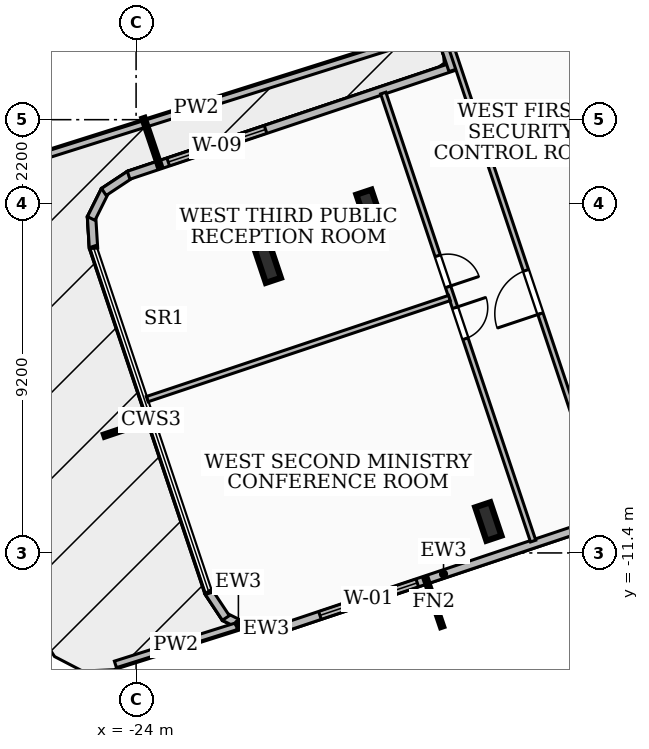
"""IFC4 building model, lengths in metres.
Left out: names, types, materials, properties, quantities, classifications, styles, units other than length and angle.
Written with IfcOpenShell. Run it as: python <this file> out.ifc"""

import sys

from ifc_helpers import new_model, si_unit, direction, frame, frame_2d, origin, origin_2d, place, context, subcontext, project, spatial, rectangle, i_section, extrude, element, fill, save


model = new_model("IFC4")
c1 = context("Model", 3, precision=1e-05, world=origin(), true_north=direction((0.0, 1.0)))
c2 = subcontext(c1, "Body", "Model", "MODEL_VIEW")
j1 = project(units=[si_unit("LENGTHUNIT", "METRE"), si_unit("PLANEANGLEUNIT", "RADIAN")], contexts=[c1])
p1 = place(None, origin())
s1 = spatial("IfcSite", under=j1, at=p1, CompositionType="ELEMENT")
p2 = place(p1, origin())
s2 = spatial("IfcBuilding", under=s1, at=p2, CompositionType="ELEMENT")
p3 = place(p2, frame((0.0, 0.0, 155.88)))
s3 = spatial("IfcBuildingStorey", under=s2, at=p3, CompositionType="ELEMENT", Elevation=155.88)
for number, where, z_axis, x_axis in (
    (1, (-17.858, -2.346, 0.0), (0.0, 0.0, 1.0), (0.948, 0.317, 0.0)),
    (2, (-20.535, -3.788, 0.0), (0.0, 0.0, 1.0), (0.948, 0.317, 0.0)),
    (3, (-14.731, -10.573, 0.0), (0.0, 0.0, 1.0), (0.948, 0.317, 0.0)),
):
    element("IfcColumn", number, at=place(p3, frame(where, z_axis=z_axis, x_axis=x_axis)), inside=s3, PredefinedType="COLUMN", context=c2, shape_type="SweptSolid", body=[
        extrude(i_section(OverallWidth=0.418, OverallDepth=0.927, WebThickness=0.019, FlangeThickness=0.032, at=origin_2d()), origin(), (0.0, 0.0, 1.0), 3.6),
    ])
p4 = place(p3, frame((-11.615, -10.519, 0.0), z_axis=(0.0, 0.0, 1.0), x_axis=(-0.948329626758, -0.317286808759, 0.0)))
e4 = element("IfcWall", 4, at=p4, inside=s3, PredefinedType="SOLIDWALL", context=c2, shape_type="SweptSolid", body=[
    extrude(rectangle(XDim=9.058, YDim=0.22, at=frame_2d((4.529, 0.0))), origin(), (0.0, 0.0, 1.0), 3.34),
])
p5 = place(p4, frame((5.258, 0.0, 0.85)))
e5 = element("IfcOpeningElement", 5, at=p5, cuts=e4, PredefinedType="OPENING", context=c2, shape_type="SweptSolid", body=[
    extrude(rectangle(XDim=2.7, YDim=2.1, at=frame_2d((1.35, 1.05))), frame((0.0, 0.12, 0.0), z_axis=(0.0, -1.0, 0.0), x_axis=(1.0, 0.0, 0.0)), (0.0, 0.0, 1.0), 0.24),
])
p6 = place(p3, frame((-20.156, -13.383, 0.0), z_axis=(0.0, 0.0, 1.0), x_axis=(-0.998057128569, -0.062305442082, 0.0)))
e6 = element("IfcWall", 6, at=p6, inside=s3, PredefinedType="SOLIDWALL", context=c2, shape_type="SweptSolid", body=[
    extrude(rectangle(XDim=0.835, YDim=0.22, at=frame_2d((0.417, 0.0))), origin(), (0.0, 0.0, 1.0), 3.34),
])
p7 = place(p3, frame((-20.942, -13.444, 0.0), z_axis=(0.0, 0.0, 1.0), x_axis=(-0.894963703084, 0.446138958356, 0.0)))
e7 = element("IfcWall", 7, at=p7, inside=s3, PredefinedType="SOLIDWALL", context=c2, shape_type="SweptSolid", body=[
    extrude(rectangle(XDim=0.818, YDim=0.22, at=frame_2d((0.409, 0.0))), origin(), (0.0, 0.0, 1.0), 3.34),
])
p8 = place(p3, frame((-21.638, -13.111, 0.0), z_axis=(0.0, 0.0, 1.0), x_axis=(-0.552336300706, 0.833621383437, 0.0)))
e8 = element("IfcWall", 8, at=p8, inside=s3, PredefinedType="SOLIDWALL", context=c2, shape_type="SweptSolid", body=[
    extrude(rectangle(XDim=0.835, YDim=0.22, at=frame_2d((0.417, 0.0))), origin(), (0.0, 0.0, 1.0), 3.34),
])
p9 = place(p3, frame((-25.12, -3.384, 0.0), z_axis=(0.0, 0.0, 1.0), x_axis=(-0.062378286155, 0.998052578483, 0.0)))
e9 = element("IfcWall", 9, at=p9, inside=s3, PredefinedType="SOLIDWALL", context=c2, shape_type="SweptSolid", body=[
    extrude(rectangle(XDim=0.834, YDim=0.22, at=frame_2d((0.417, 0.0))), origin(), (0.0, 0.0, 1.0), 3.34),
])
p10 = place(p3, frame((-25.181, -2.599, 0.0), z_axis=(0.0, 0.0, 1.0), x_axis=(0.445662792415, 0.895200913459, 0.0)))
e10 = element("IfcWall", 10, at=p10, inside=s3, PredefinedType="SOLIDWALL", context=c2, shape_type="SweptSolid", body=[
    extrude(rectangle(XDim=0.819, YDim=0.22, at=frame_2d((0.41, 0.0))), origin(), (0.0, 0.0, 1.0), 3.34),
])
p11 = place(p3, frame((-24.848, -1.902, 0.0), z_axis=(0.0, 0.0, 1.0), x_axis=(0.833532147948, 0.552470957008, 0.0)))
e11 = element("IfcWall", 11, at=p11, inside=s3, PredefinedType="SOLIDWALL", context=c2, shape_type="SweptSolid", body=[
    extrude(rectangle(XDim=0.835, YDim=0.22, at=frame_2d((0.417, 0.0))), origin(), (0.0, 0.0, 1.0), 3.34),
])
p12 = place(p3, frame((-24.197, -1.463, 0.0), z_axis=(0.0, 0.0, 1.0), x_axis=(0.948337736373, 0.31726256913, 0.0)))
e12 = element("IfcWall", 12, at=p12, inside=s3, PredefinedType="SOLIDWALL", context=c2, shape_type="SweptSolid", body=[
    extrude(rectangle(XDim=9.058, YDim=0.22, at=frame_2d((4.529, 0.0))), origin(), (0.0, 0.0, 1.0), 3.34),
])
p13 = place(p12, frame((1.1, 0.0, 0.85)))
e13 = element("IfcOpeningElement", 13, at=p13, cuts=e12, PredefinedType="OPENING", context=c2, shape_type="SweptSolid", body=[
    extrude(rectangle(XDim=2.7, YDim=1.65, at=frame_2d((1.35, 0.825))), frame((0.0, 0.12, 0.0), z_axis=(0.0, -1.0, 0.0), x_axis=(1.0, 0.0, 0.0)), (0.0, 0.0, 1.0), 0.24),
])
p14 = place(p3, frame((-15.662, 1.3, 0.0), z_axis=(0.0, 0.0, 1.0), x_axis=(-0.317224676093, 0.948350412494, 0.0)))
e14 = element("IfcWall", 14, at=p14, inside=s3, PredefinedType="SOLIDWALL", context=c2, shape_type="SweptSolid", body=[
    extrude(rectangle(XDim=6.758, YDim=0.22, at=frame_2d((3.379, 0.0))), origin(), (0.0, 0.0, 1.0), 3.34),
])
p15 = place(p3, frame((-16.274, 2.255, 0.0), z_axis=(0.0, 0.0, 1.0), x_axis=(-0.953646241079, -0.300929970054, 0.0)))
e15 = element("IfcWall", 15, at=p15, inside=s3, PredefinedType="PARAPET", context=c2, shape_type="SweptSolid", body=[
    extrude(rectangle(XDim=12.88, YDim=0.18, at=frame_2d((6.44, 0.0))), origin(), (0.0, 0.0, 1.0), 0.88),
])
p16 = place(p3, frame((-24.544, -14.333, 0.0), z_axis=(0.0, 0.0, 1.0), x_axis=(0.953694118422, 0.300778204807, 0.0)))
e16 = element("IfcWall", 16, at=p16, inside=s3, PredefinedType="PARAPET", context=c2, shape_type="SweptSolid", body=[
    extrude(rectangle(XDim=3.342, YDim=0.18, at=frame_2d((1.671, 0.0))), origin(), (0.0, 0.0, 1.0), 0.88),
])
p17 = place(p3, frame((-10.372, -14.037, 0.0), z_axis=(0.0, 0.0, 1.0), x_axis=(-0.317298382655, 0.94832575435, 0.0)))
e17 = element("IfcWall", 17, at=p17, inside=s3, PredefinedType="PARTITIONING", context=c2, shape_type="SweptSolid", body=[
    extrude(rectangle(XDim=20.041, YDim=0.145, at=frame_2d((10.021, 0.0))), origin(), (0.0, 0.0, 1.0), 2.644),
])
p18 = place(p17, frame((9.42, 0.0, 0.0)))
e18 = element("IfcOpeningElement", 18, at=p18, cuts=e17, PredefinedType="OPENING", context=c2, shape_type="SweptSolid", body=[
    extrude(rectangle(XDim=1.2, YDim=2.1, at=frame_2d((0.6, 1.05))), frame((0.0, 0.083, 0.0), z_axis=(0.0, -1.0, 0.0), x_axis=(1.0, 0.0, 0.0)), (0.0, 0.0, 1.0), 0.165),
])
p19 = place(p3, frame((-15.755, -4.692, 0.0), z_axis=(0.0, 0.0, 1.0), x_axis=(-0.948309976651, -0.31734553437, 0.0)))
e19 = element("IfcWall", 19, at=p19, inside=s3, PredefinedType="PARTITIONING", context=c2, shape_type="SweptSolid", body=[
    extrude(rectangle(XDim=8.385, YDim=0.145, at=frame_2d((4.193, 0.0))), origin(), (0.0, 0.0, 1.0), 2.793),
])
p20 = place(p3, frame((-17.496, 0.7, 0.0), z_axis=(0.0, 0.0, 1.0), x_axis=(0.317299961245, -0.948325226172, 0.0)))
e20 = element("IfcWall", 20, at=p20, inside=s3, PredefinedType="PARTITIONING", context=c2, shape_type="SweptSolid", body=[
    extrude(rectangle(XDim=12.43, YDim=0.145, at=frame_2d((6.215, 0.0))), origin(), (0.0, 0.0, 1.0), 2.644),
])
p21 = place(p20, frame((4.515, 0.0, 0.0)))
e21 = element("IfcOpeningElement", 21, at=p21, cuts=e20, PredefinedType="OPENING", context=c2, shape_type="SweptSolid", body=[
    extrude(rectangle(XDim=0.86, YDim=2.04, at=frame_2d((0.43, 1.02))), frame((0.0, 0.083, 0.0), z_axis=(0.0, -1.0, 0.0), x_axis=(1.0, 0.0, 0.0)), (0.0, 0.0, 1.0), 0.165),
])
p22 = place(p20, frame((5.955, 0.0, 0.0)))
e22 = element("IfcOpeningElement", 22, at=p22, cuts=e20, PredefinedType="OPENING", context=c2, shape_type="SweptSolid", body=[
    extrude(rectangle(XDim=0.86, YDim=2.04, at=frame_2d((0.43, 1.02))), frame((0.0, 0.083, 0.0), z_axis=(0.0, -1.0, 0.0), x_axis=(1.0, 0.0, 0.0)), (0.0, 0.0, 1.0), 0.165),
])
p23 = place(p5, origin())
e23 = element("IfcWindow", 23, at=p23, inside=s3, PartitioningType="SINGLE_PANEL", PredefinedType="WINDOW", context=c2, shape_type="SweptSolid", body=[
    extrude(rectangle(XDim=2.7, YDim=2.1, at=frame_2d((1.35, 1.05))), frame((0.0, 0.03, 0.0), z_axis=(0.0, -1.0, 0.0), x_axis=(1.0, 0.0, 0.0)), (0.0, 0.0, 1.0), 0.06),
])
fill(e5, e23)
p24 = place(p13, origin())
e24 = element("IfcWindow", 24, at=p24, inside=s3, PartitioningType="SINGLE_PANEL", PredefinedType="WINDOW", context=c2, shape_type="SweptSolid", body=[
    extrude(rectangle(XDim=2.7, YDim=1.65, at=frame_2d((1.35, 0.825))), frame((0.0, 0.03, 0.0), z_axis=(0.0, -1.0, 0.0), x_axis=(1.0, 0.0, 0.0)), (0.0, 0.0, 1.0), 0.06),
])
fill(e13, e24)
p25 = place(p3, frame((0.0, 0.0, -0.26)))
p26 = place(p25, frame((-25.905, -8.291, 0.0)))
p27 = place(p26, frame((0.0, 0.0, 0.21)))
e25 = element("IfcWindow", 25, at=p27, inside=s3, PartitioningType="SINGLE_PANEL", PredefinedType="SKYLIGHT", context=c2, shape_type="SweptSolid", body=[
    extrude(rectangle(XDim=1.0, YDim=1.5, at=origin_2d()), origin(), (0.0, 0.0, 1.0), 0.05),
])
p28 = place(p18, origin())
e26 = element("IfcDoor", 26, at=p28, inside=s3, OperationType="SINGLE_SWING_LEFT", PredefinedType="DOOR", context=c2, shape_type="SweptSolid", body=[
    extrude(rectangle(XDim=1.2, YDim=2.1, at=frame_2d((0.6, 1.05))), frame((0.0, 0.025, 0.0), z_axis=(0.0, -1.0, 0.0), x_axis=(1.0, 0.0, 0.0)), (0.0, 0.0, 1.0), 0.05),
])
fill(e18, e26)
p29 = place(p21, origin())
e27 = element("IfcDoor", 27, at=p29, inside=s3, OperationType="SINGLE_SWING_RIGHT", PredefinedType="DOOR", context=c2, shape_type="SweptSolid", body=[
    extrude(rectangle(XDim=0.86, YDim=2.04, at=frame_2d((0.43, 1.02))), frame((0.0, 0.025, 0.0), z_axis=(0.0, -1.0, 0.0), x_axis=(1.0, 0.0, 0.0)), (0.0, 0.0, 1.0), 0.05),
])
fill(e21, e27)
p30 = place(p22, origin())
e28 = element("IfcDoor", 28, at=p30, inside=s3, OperationType="SINGLE_SWING_LEFT", PredefinedType="DOOR", context=c2, shape_type="SweptSolid", body=[
    extrude(rectangle(XDim=0.86, YDim=2.04, at=frame_2d((0.43, 1.02))), frame((0.0, 0.025, 0.0), z_axis=(0.0, -1.0, 0.0), x_axis=(1.0, 0.0, 0.0)), (0.0, 0.0, 1.0), 0.05),
])
fill(e22, e28)
save(model, sys.argv[1])
